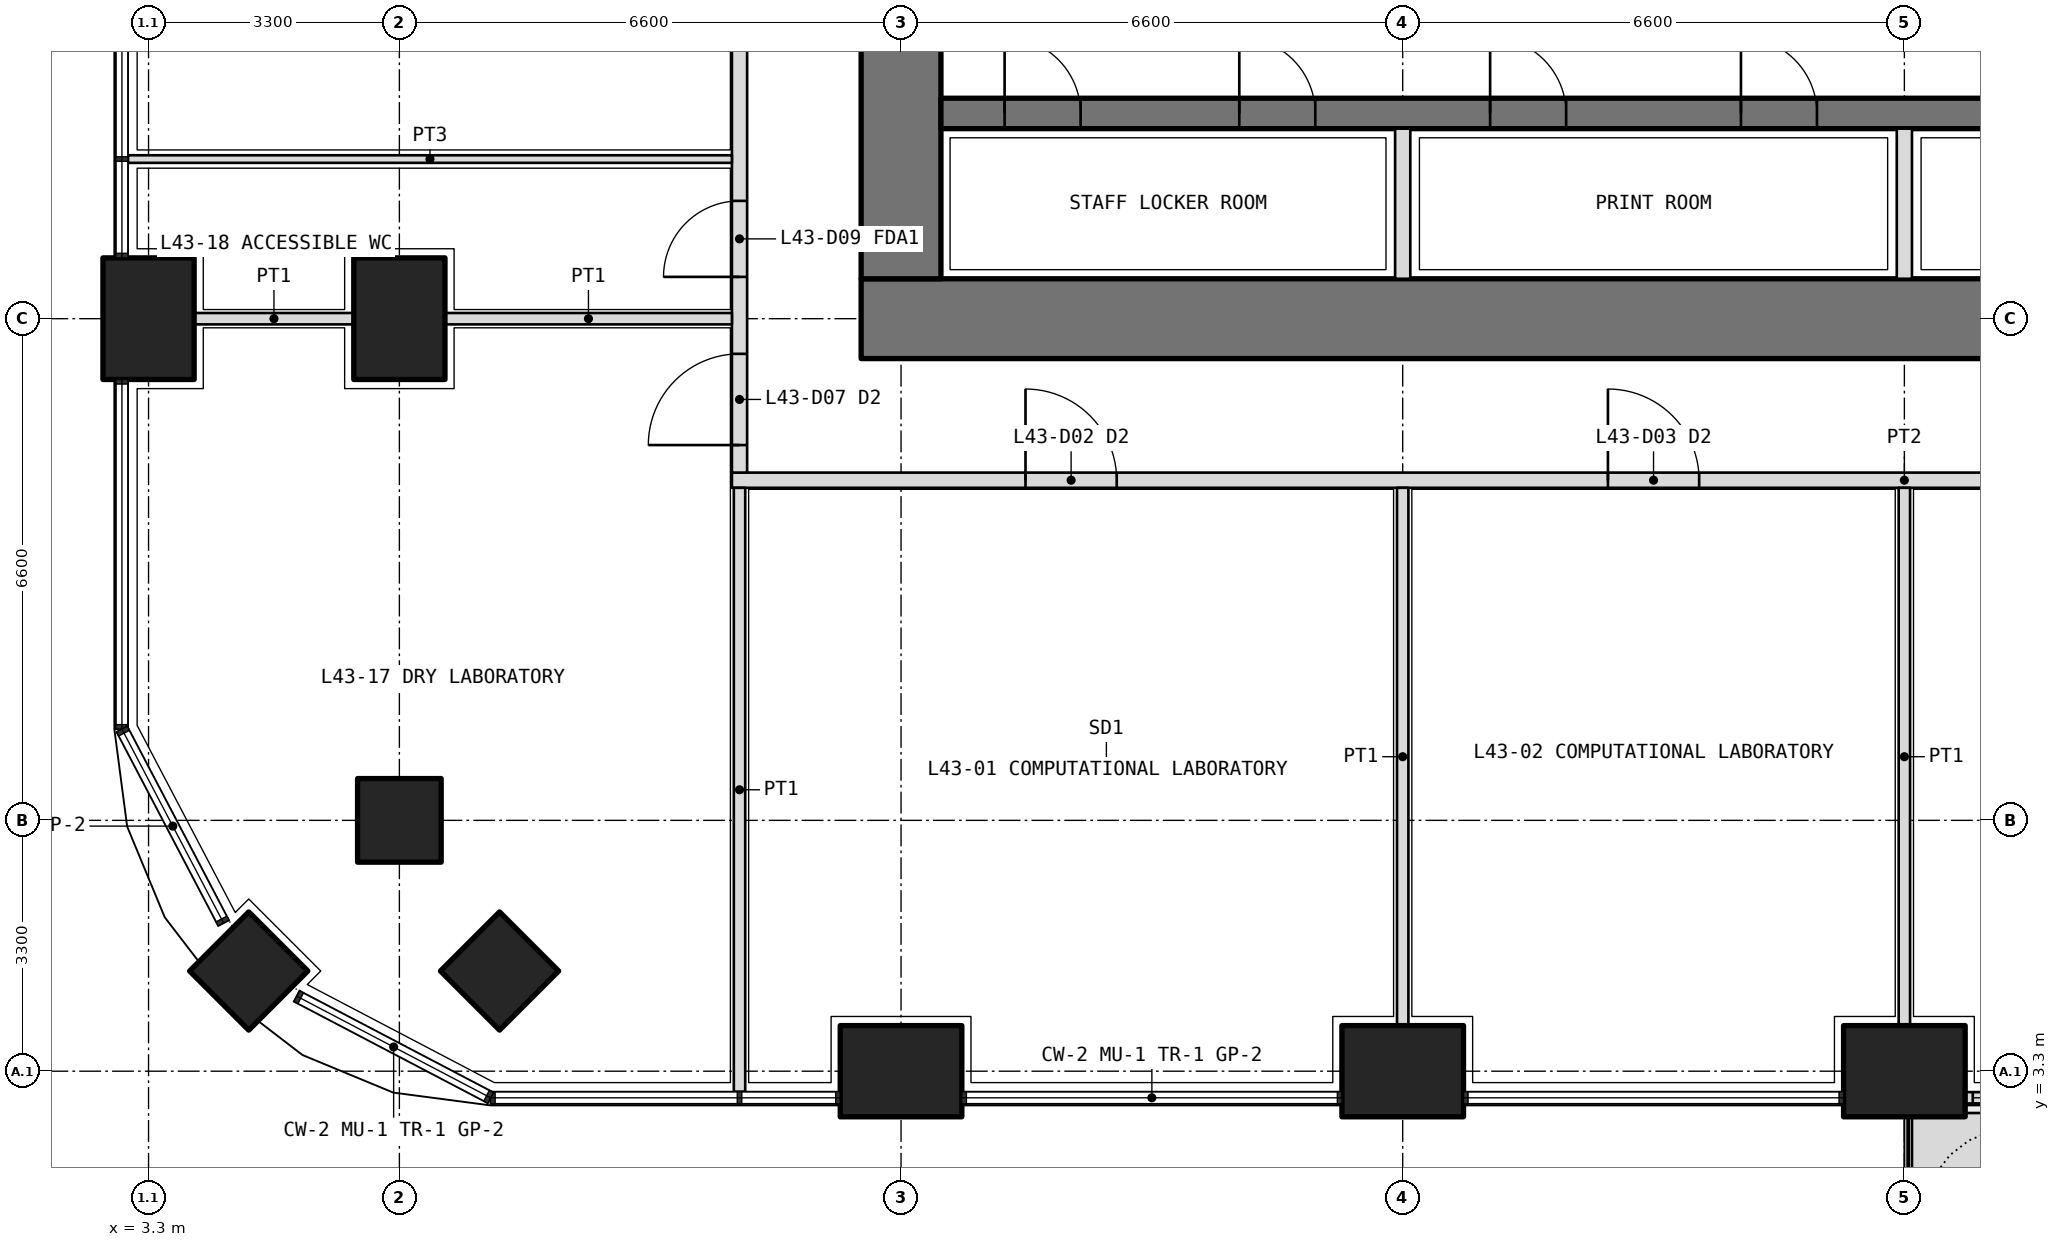
"""IFC4 building model, lengths in metres.
Left out: names, types, materials, properties, quantities, classifications, styles, units other than length and angle.
Written with IfcOpenShell. Run it as: python <this file> out.ifc"""

import sys

from ifc_helpers import new_model, si_unit, direction, frame, frame_2d, origin, origin_2d, place, context, subcontext, project, spatial, polyline, rectangle, outline, extrude, element, fill, save


model = new_model("IFC4")
c1 = context("Model", 3, precision=1e-05, world=origin(), true_north=direction((0.0, 1.0)))
c2 = subcontext(c1, "Body", "Model", "MODEL_VIEW")
j1 = project(units=[si_unit("LENGTHUNIT", "METRE"), si_unit("PLANEANGLEUNIT", "RADIAN")], contexts=[c1])
p1 = place(None, origin())
s1 = spatial("IfcSite", under=j1, at=p1, CompositionType="ELEMENT")
p2 = place(p1, origin())
s2 = spatial("IfcBuilding", under=s1, at=p2, CompositionType="ELEMENT")
p3 = place(p2, frame((0.0, 0.0, 189.3)))
s3 = spatial("IfcBuildingStorey", under=s2, at=p3, CompositionType="ELEMENT", Elevation=189.3)
p4 = place(p3, frame((4.618, 4.618, 0.0), z_axis=(0.0, 0.0, 1.0), x_axis=(0.707106781187, 0.707106781187, 0.0)))
e1 = element("IfcColumn", 1, at=p4, inside=s3, PredefinedType="COLUMN", context=c2, shape_type="SweptSolid", body=[
    extrude(rectangle(XDim=1.1, YDim=1.1, at=origin_2d()), origin(), (0.0, 0.0, 1.0), 4.2),
])
for number, where, z_axis, x_axis in (
    (2, (13.2, 3.3, 0.0), (0.0, 0.0, 1.0), (1.0, 0.0, 0.0)),
    (3, (19.8, 3.3, 0.0), (0.0, 0.0, 1.0), (1.0, 0.0, 0.0)),
    (4, (26.4, 3.3, 0.0), (0.0, 0.0, 1.0), (1.0, 0.0, 0.0)),
    (5, (3.3, 13.2, 0.0), (0.0, 0.0, 1.0), (0.0, 1.0, 0.0)),
):
    element("IfcColumn", number, at=place(p3, frame(where, z_axis=z_axis, x_axis=x_axis)), inside=s3, PredefinedType="COLUMN", context=c2, shape_type="SweptSolid", body=[
        extrude(rectangle(XDim=1.6, YDim=1.2, at=origin_2d()), origin(), (0.0, 0.0, 1.0), 4.2),
    ])
for number, where, z_axis, x_axis in (
    (6, (6.6, 6.6, 0.0), (0.0, 0.0, 1.0), (1.0, 0.0, 0.0)),
    (7, (7.918, 4.618, 0.0), (0.0, 0.0, 1.0), (0.707, 0.707, 0.0)),
):
    element("IfcColumn", number, at=place(p3, frame(where, z_axis=z_axis, x_axis=x_axis)), inside=s3, PredefinedType="COLUMN", context=c2, shape_type="SweptSolid", body=[
        extrude(rectangle(XDim=1.1, YDim=1.1, at=origin_2d()), origin(), (0.0, 0.0, 1.0), 4.2),
    ])
p5 = place(p3, frame((6.6, 13.2, 0.0), z_axis=(0.0, 0.0, 1.0), x_axis=(0.0, 1.0, 0.0)))
e8 = element("IfcColumn", 8, at=p5, inside=s3, PredefinedType="COLUMN", context=c2, shape_type="SweptSolid", body=[
    extrude(rectangle(XDim=1.6, YDim=1.2, at=origin_2d()), origin(), (0.0, 0.0, 1.0), 4.2),
])
p6 = place(p3, origin())
e9 = element("IfcWall", 9, at=p6, inside=s3, PredefinedType="USERDEFINED", context=c2, shape_type="SweptSolid", body=[
    extrude(outline(polyline([(26.5, 1.75), (28.95, 1.75), (28.95, 2.75), (26.5, 2.75), (26.5, 1.75)]), holes=[polyline([(26.65, 1.9), (28.8, 1.9), (28.8, 2.6), (26.65, 2.6), (26.65, 1.9)])]), origin(), (0.0, 0.0, 1.0), 1.05),
])
p7 = place(p3, frame((27.2, 2.95, 0.0), z_axis=(0.0, 0.0, 1.0), x_axis=(1.0, 0.0, 0.0)))
e10 = element("IfcWall", 10, at=p7, inside=s3, PredefinedType="SOLIDWALL", context=c2, shape_type="SweptSolid", body=[
    extrude(rectangle(XDim=5.0, YDim=0.15, at=frame_2d((2.5, 0.0))), origin(), (0.0, 0.0, 1.0), 2.7),
])
p8 = place(p7, frame((2.75, 0.0, 0.0)))
e11 = element("IfcOpeningElement", 11, at=p8, cuts=e10, PredefinedType="OPENING", context=c2, shape_type="SweptSolid", body=[
    extrude(rectangle(XDim=1.0, YDim=2.4, at=frame_2d((0.5, 1.2))), frame((0.0, 0.085, 0.0), z_axis=(0.0, -1.0, 0.0), x_axis=(1.0, 0.0, 0.0)), (0.0, 0.0, 1.0), 0.17),
])
p9 = place(p7, frame((0.1, 0.0, 0.1)))
e12 = element("IfcOpeningElement", 12, at=p9, cuts=e10, PredefinedType="OPENING", context=c2, shape_type="SweptSolid", body=[
    extrude(rectangle(XDim=2.15, YDim=2.3, at=frame_2d((1.075, 1.15))), frame((0.0, 0.085, 0.0), z_axis=(0.0, -1.0, 0.0), x_axis=(1.0, 0.0, 0.0)), (0.0, 0.0, 1.0), 0.17),
])
p10 = place(p7, frame((3.85, 0.0, 0.1)))
e13 = element("IfcOpeningElement", 13, at=p10, cuts=e10, PredefinedType="OPENING", context=c2, shape_type="SweptSolid", body=[
    extrude(rectangle(XDim=1.05, YDim=2.3, at=frame_2d((0.525, 1.15))), frame((0.0, 0.085, 0.0), z_axis=(0.0, -1.0, 0.0), x_axis=(1.0, 0.0, 0.0)), (0.0, 0.0, 1.0), 0.17),
])
p11 = place(p3, frame((12.675, 13.2, 0.0), z_axis=(0.0, 0.0, 1.0), x_axis=(1.0, 0.0, 0.0)))
e14 = element("IfcWall", 14, at=p11, inside=s3, PredefinedType="SHEAR", context=c2, shape_type="SweptSolid", body=[
    extrude(rectangle(XDim=27.45, YDim=1.05, at=frame_2d((13.725, 0.0))), origin(), (0.0, 0.0, 1.0), 4.2),
])
p12 = place(p3, frame((13.2, 32.475, 0.0), z_axis=(0.0, 0.0, 1.0), x_axis=(0.0, -1.0, 0.0)))
e15 = element("IfcWall", 15, at=p12, inside=s3, PredefinedType="SHEAR", context=c2, shape_type="SweptSolid", body=[
    extrude(rectangle(XDim=18.75, YDim=1.05, at=frame_2d((9.375, 0.0))), origin(), (0.0, 0.0, 1.0), 4.2),
])
p13 = place(p12, frame((14.125, 0.0, 0.0)))
e16 = element("IfcOpeningElement", 16, at=p13, cuts=e15, PredefinedType="OPENING", context=c2, shape_type="SweptSolid", body=[
    extrude(rectangle(XDim=1.6, YDim=2.1, at=frame_2d((0.8, 1.05))), frame((0.0, 0.535, 0.0), z_axis=(0.0, -1.0, 0.0), x_axis=(1.0, 0.0, 0.0)), (0.0, 0.0, 1.0), 1.07),
])
p14 = place(p12, frame((3.325, 0.0, 0.0)))
e17 = element("IfcOpeningElement", 17, at=p14, cuts=e15, PredefinedType="OPENING", context=c2, shape_type="SweptSolid", body=[
    extrude(rectangle(XDim=1.6, YDim=2.1, at=frame_2d((0.8, 1.05))), frame((0.0, 0.535, 0.0), z_axis=(0.0, -1.0, 0.0), x_axis=(1.0, 0.0, 0.0)), (0.0, 0.0, 1.0), 1.07),
])
p15 = place(p3, frame((13.725, 15.9, 0.0), z_axis=(0.0, 0.0, 1.0), x_axis=(1.0, 0.0, 0.0)))
e18 = element("IfcWall", 18, at=p15, inside=s3, PredefinedType="SHEAR", context=c2, shape_type="SweptSolid", body=[
    extrude(rectangle(XDim=25.35, YDim=0.4, at=frame_2d((12.675, 0.0))), origin(), (0.0, 0.0, 1.0), 4.2),
])
p16 = place(p15, frame((0.837, 0.0, 0.0)))
e19 = element("IfcOpeningElement", 19, at=p16, cuts=e18, PredefinedType="OPENING", context=c2, shape_type="SweptSolid", body=[
    extrude(rectangle(XDim=1.0, YDim=2.1, at=frame_2d((0.5, 1.05))), frame((0.0, 0.21, 0.0), z_axis=(0.0, -1.0, 0.0), x_axis=(1.0, 0.0, 0.0)), (0.0, 0.0, 1.0), 0.42),
])
p17 = place(p15, frame((3.925, 0.0, 0.0)))
e20 = element("IfcOpeningElement", 20, at=p17, cuts=e18, PredefinedType="OPENING", context=c2, shape_type="SweptSolid", body=[
    extrude(rectangle(XDim=1.0, YDim=2.1, at=frame_2d((0.5, 1.05))), frame((0.0, 0.21, 0.0), z_axis=(0.0, -1.0, 0.0), x_axis=(1.0, 0.0, 0.0)), (0.0, 0.0, 1.0), 0.42),
])
p18 = place(p15, frame((7.225, 0.0, 0.0)))
e21 = element("IfcOpeningElement", 21, at=p18, cuts=e18, PredefinedType="OPENING", context=c2, shape_type="SweptSolid", body=[
    extrude(rectangle(XDim=1.0, YDim=2.1, at=frame_2d((0.5, 1.05))), frame((0.0, 0.21, 0.0), z_axis=(0.0, -1.0, 0.0), x_axis=(1.0, 0.0, 0.0)), (0.0, 0.0, 1.0), 0.42),
])
p19 = place(p15, frame((10.525, 0.0, 0.0)))
e22 = element("IfcOpeningElement", 22, at=p19, cuts=e18, PredefinedType="OPENING", context=c2, shape_type="SweptSolid", body=[
    extrude(rectangle(XDim=1.0, YDim=2.1, at=frame_2d((0.5, 1.05))), frame((0.0, 0.21, 0.0), z_axis=(0.0, -1.0, 0.0), x_axis=(1.0, 0.0, 0.0)), (0.0, 0.0, 1.0), 0.42),
])
p20 = place(p15, frame((13.825, 0.0, 0.0)))
e23 = element("IfcOpeningElement", 23, at=p20, cuts=e18, PredefinedType="OPENING", context=c2, shape_type="SweptSolid", body=[
    extrude(rectangle(XDim=1.0, YDim=2.1, at=frame_2d((0.5, 1.05))), frame((0.0, 0.21, 0.0), z_axis=(0.0, -1.0, 0.0), x_axis=(1.0, 0.0, 0.0)), (0.0, 0.0, 1.0), 0.42),
])
p21 = place(p15, frame((17.125, 0.0, 0.0)))
e24 = element("IfcOpeningElement", 24, at=p21, cuts=e18, PredefinedType="OPENING", context=c2, shape_type="SweptSolid", body=[
    extrude(rectangle(XDim=1.0, YDim=2.1, at=frame_2d((0.5, 1.05))), frame((0.0, 0.21, 0.0), z_axis=(0.0, -1.0, 0.0), x_axis=(1.0, 0.0, 0.0)), (0.0, 0.0, 1.0), 0.42),
])
p22 = place(p15, frame((20.425, 0.0, 0.0)))
e25 = element("IfcOpeningElement", 25, at=p22, cuts=e18, PredefinedType="OPENING", context=c2, shape_type="SweptSolid", body=[
    extrude(rectangle(XDim=1.0, YDim=2.1, at=frame_2d((0.5, 1.05))), frame((0.0, 0.21, 0.0), z_axis=(0.0, -1.0, 0.0), x_axis=(1.0, 0.0, 0.0)), (0.0, 0.0, 1.0), 0.42),
])
p23 = place(p15, frame((23.512, 0.0, 0.0)))
e26 = element("IfcOpeningElement", 26, at=p23, cuts=e18, PredefinedType="OPENING", context=c2, shape_type="SweptSolid", body=[
    extrude(rectangle(XDim=1.0, YDim=2.1, at=frame_2d((0.5, 1.05))), frame((0.0, 0.21, 0.0), z_axis=(0.0, -1.0, 0.0), x_axis=(1.0, 0.0, 0.0)), (0.0, 0.0, 1.0), 0.42),
])
for number, where, z_axis, x_axis in (
    (27, (19.8, 13.725, 0.0), (0.0, 0.0, 1.0), (0.0, 1.0, 0.0)),
    (28, (26.4, 13.725, 0.0), (0.0, 0.0, 1.0), (0.0, 1.0, 0.0)),
):
    element("IfcWall", number, at=place(p3, frame(where, z_axis=z_axis, x_axis=x_axis)), inside=s3, PredefinedType="PARTITIONING", context=c2, shape_type="SweptSolid", body=[
        extrude(rectangle(XDim=1.975, YDim=0.2, at=frame_2d((0.987, 0.0))), origin(), (0.0, 0.0, 1.0), 4.2),
    ])
p24 = place(p3, frame((10.975, 11.075, 0.0), z_axis=(0.0, 0.0, 1.0), x_axis=(1.0, 0.0, 0.0)))
e29 = element("IfcWall", 29, at=p24, inside=s3, PredefinedType="PARTITIONING", context=c2, shape_type="SweptSolid", body=[
    extrude(rectangle(XDim=30.85, YDim=0.2, at=frame_2d((15.425, 0.0))), origin(), (0.0, 0.0, 1.0), 2.85),
])
p25 = place(p24, frame((3.863, 0.0, 0.0)))
e30 = element("IfcOpeningElement", 30, at=p25, cuts=e29, PredefinedType="OPENING", context=c2, shape_type="SweptSolid", body=[
    extrude(rectangle(XDim=1.2, YDim=2.1, at=frame_2d((0.6, 1.05))), frame((0.0, 0.11, 0.0), z_axis=(0.0, -1.0, 0.0), x_axis=(1.0, 0.0, 0.0)), (0.0, 0.0, 1.0), 0.22),
])
p26 = place(p24, frame((11.525, 0.0, 0.0)))
e31 = element("IfcOpeningElement", 31, at=p26, cuts=e29, PredefinedType="OPENING", context=c2, shape_type="SweptSolid", body=[
    extrude(rectangle(XDim=1.2, YDim=2.1, at=frame_2d((0.6, 1.05))), frame((0.0, 0.11, 0.0), z_axis=(0.0, -1.0, 0.0), x_axis=(1.0, 0.0, 0.0)), (0.0, 0.0, 1.0), 0.22),
])
p27 = place(p24, frame((18.125, 0.0, 0.0)))
e32 = element("IfcOpeningElement", 32, at=p27, cuts=e29, PredefinedType="OPENING", context=c2, shape_type="SweptSolid", body=[
    extrude(rectangle(XDim=1.2, YDim=2.1, at=frame_2d((0.6, 1.05))), frame((0.0, 0.11, 0.0), z_axis=(0.0, -1.0, 0.0), x_axis=(1.0, 0.0, 0.0)), (0.0, 0.0, 1.0), 0.22),
])
p28 = place(p24, frame((23.075, 0.0, 0.0)))
e33 = element("IfcOpeningElement", 33, at=p28, cuts=e29, PredefinedType="OPENING", context=c2, shape_type="SweptSolid", body=[
    extrude(rectangle(XDim=1.2, YDim=2.1, at=frame_2d((0.6, 1.05))), frame((0.0, 0.11, 0.0), z_axis=(0.0, -1.0, 0.0), x_axis=(1.0, 0.0, 0.0)), (0.0, 0.0, 1.0), 0.22),
])
p29 = place(p24, frame((27.438, 0.0, 0.0)))
e34 = element("IfcOpeningElement", 34, at=p29, cuts=e29, PredefinedType="OPENING", context=c2, shape_type="SweptSolid", body=[
    extrude(rectangle(XDim=1.2, YDim=2.1, at=frame_2d((0.6, 1.05))), frame((0.0, 0.11, 0.0), z_axis=(0.0, -1.0, 0.0), x_axis=(1.0, 0.0, 0.0)), (0.0, 0.0, 1.0), 0.22),
])
p30 = place(p3, frame((11.075, 11.175, 0.0), z_axis=(0.0, 0.0, 1.0), x_axis=(0.0, 1.0, 0.0)))
e35 = element("IfcWall", 35, at=p30, inside=s3, PredefinedType="PARTITIONING", context=c2, shape_type="SweptSolid", body=[
    extrude(rectangle(XDim=15.225, YDim=0.2, at=frame_2d((7.612, 0.0))), origin(), (0.0, 0.0, 1.0), 2.85),
])
p31 = place(p30, frame((0.363, 0.0, 0.0)))
e36 = element("IfcOpeningElement", 36, at=p31, cuts=e35, PredefinedType="OPENING", context=c2, shape_type="SweptSolid", body=[
    extrude(rectangle(XDim=1.2, YDim=2.1, at=frame_2d((0.6, 1.05))), frame((0.0, 0.11, 0.0), z_axis=(0.0, -1.0, 0.0), x_axis=(1.0, 0.0, 0.0)), (0.0, 0.0, 1.0), 0.22),
])
p32 = place(p30, frame((2.575, 0.0, 0.0)))
e37 = element("IfcOpeningElement", 37, at=p32, cuts=e35, PredefinedType="OPENING", context=c2, shape_type="SweptSolid", body=[
    extrude(rectangle(XDim=1.0, YDim=2.1, at=frame_2d((0.5, 1.05))), frame((0.0, 0.11, 0.0), z_axis=(0.0, -1.0, 0.0), x_axis=(1.0, 0.0, 0.0)), (0.0, 0.0, 1.0), 0.22),
])
p33 = place(p30, frame((5.625, 0.0, 0.0)))
e38 = element("IfcOpeningElement", 38, at=p33, cuts=e35, PredefinedType="OPENING", context=c2, shape_type="SweptSolid", body=[
    extrude(rectangle(XDim=0.9, YDim=2.1, at=frame_2d((0.45, 1.05))), frame((0.0, 0.11, 0.0), z_axis=(0.0, -1.0, 0.0), x_axis=(1.0, 0.0, 0.0)), (0.0, 0.0, 1.0), 0.22),
])
p34 = place(p30, frame((9.425, 0.0, 0.0)))
e39 = element("IfcOpeningElement", 39, at=p34, cuts=e35, PredefinedType="OPENING", context=c2, shape_type="SweptSolid", body=[
    extrude(rectangle(XDim=0.9, YDim=2.1, at=frame_2d((0.45, 1.05))), frame((0.0, 0.11, 0.0), z_axis=(0.0, -1.0, 0.0), x_axis=(1.0, 0.0, 0.0)), (0.0, 0.0, 1.0), 0.22),
])
p35 = place(p30, frame((12.975, 0.0, 0.0)))
e40 = element("IfcOpeningElement", 40, at=p35, cuts=e35, PredefinedType="OPENING", context=c2, shape_type="SweptSolid", body=[
    extrude(rectangle(XDim=1.0, YDim=2.1, at=frame_2d((0.5, 1.05))), frame((0.0, 0.11, 0.0), z_axis=(0.0, -1.0, 0.0), x_axis=(1.0, 0.0, 0.0)), (0.0, 0.0, 1.0), 0.22),
])
p36 = place(p3, frame((11.075, 3.03, 0.0), z_axis=(0.0, 0.0, 1.0), x_axis=(0.0, 1.0, 0.0)))
e41 = element("IfcWall", 41, at=p36, inside=s3, PredefinedType="PARTITIONING", context=c2, shape_type="SweptSolid", body=[
    extrude(rectangle(XDim=7.945, YDim=0.15, at=frame_2d((3.973, 0.0))), origin(), (0.0, 0.0, 1.0), 2.7),
])
for number, where, z_axis, x_axis in (
    (42, (19.8, 3.9, 0.0), (0.0, 0.0, 1.0), (0.0, 1.0, 0.0)),
    (43, (26.4, 3.9, 0.0), (0.0, 0.0, 1.0), (0.0, 1.0, 0.0)),
):
    element("IfcWall", number, at=place(p3, frame(where, z_axis=z_axis, x_axis=x_axis)), inside=s3, PredefinedType="PARTITIONING", context=c2, shape_type="SweptSolid", body=[
        extrude(rectangle(XDim=7.075, YDim=0.15, at=frame_2d((3.538, 0.0))), origin(), (0.0, 0.0, 1.0), 2.85),
    ])
p37 = place(p3, frame((3.03, 15.3, 0.0), z_axis=(0.0, 0.0, 1.0), x_axis=(1.0, 0.0, 0.0)))
e44 = element("IfcWall", 44, at=p37, inside=s3, PredefinedType="PARTITIONING", context=c2, shape_type="SweptSolid", body=[
    extrude(rectangle(XDim=7.945, YDim=0.1, at=frame_2d((3.973, 0.0))), origin(), (0.0, 0.0, 1.0), 2.7),
])
p38 = place(p3, frame((3.9, 13.2, 0.0), z_axis=(0.0, 0.0, 1.0), x_axis=(1.0, 0.0, 0.0)))
e45 = element("IfcWall", 45, at=p38, inside=s3, PredefinedType="PARTITIONING", context=c2, shape_type="SweptSolid", body=[
    extrude(rectangle(XDim=2.1, YDim=0.15, at=frame_2d((1.05, 0.0))), origin(), (0.0, 0.0, 1.0), 2.85),
])
p39 = place(p3, frame((7.2, 13.2, 0.0), z_axis=(0.0, 0.0, 1.0), x_axis=(1.0, 0.0, 0.0)))
e46 = element("IfcWall", 46, at=p39, inside=s3, PredefinedType="PARTITIONING", context=c2, shape_type="SweptSolid", body=[
    extrude(rectangle(XDim=3.775, YDim=0.15, at=frame_2d((1.888, 0.0))), origin(), (0.0, 0.0, 1.0), 2.85),
])
p40 = place(p9, origin())
e47 = element("IfcWindow", 47, at=p40, inside=s3, PartitioningType="SINGLE_PANEL", PredefinedType="WINDOW", context=c2, shape_type="SweptSolid", body=[
    extrude(rectangle(XDim=2.15, YDim=2.3, at=frame_2d((1.075, 1.15))), frame((0.0, 0.03, 0.0), z_axis=(0.0, -1.0, 0.0), x_axis=(1.0, 0.0, 0.0)), (0.0, 0.0, 1.0), 0.06),
])
fill(e12, e47)
p41 = place(p25, origin())
e48 = element("IfcDoor", 48, at=p41, inside=s3, OperationType="DOUBLE_DOOR_SINGLE_SWING", PredefinedType="DOOR", context=c2, shape_type="SweptSolid", body=[
    extrude(rectangle(XDim=1.2, YDim=2.1, at=frame_2d((0.6, 1.05))), frame((0.0, 0.025, 0.0), z_axis=(0.0, -1.0, 0.0), x_axis=(1.0, 0.0, 0.0)), (0.0, 0.0, 1.0), 0.05),
])
fill(e30, e48)
p42 = place(p26, origin())
e49 = element("IfcDoor", 49, at=p42, inside=s3, OperationType="DOUBLE_DOOR_SINGLE_SWING", PredefinedType="DOOR", context=c2, shape_type="SweptSolid", body=[
    extrude(rectangle(XDim=1.2, YDim=2.1, at=frame_2d((0.6, 1.05))), frame((0.0, 0.025, 0.0), z_axis=(0.0, -1.0, 0.0), x_axis=(1.0, 0.0, 0.0)), (0.0, 0.0, 1.0), 0.05),
])
fill(e31, e49)
p43 = place(p31, origin())
e50 = element("IfcDoor", 50, at=p43, inside=s3, OperationType="DOUBLE_DOOR_SINGLE_SWING", PredefinedType="DOOR", context=c2, shape_type="SweptSolid", body=[
    extrude(rectangle(XDim=1.2, YDim=2.1, at=frame_2d((0.6, 1.05))), frame((0.0, 0.025, 0.0), z_axis=(0.0, -1.0, 0.0), x_axis=(1.0, 0.0, 0.0)), (0.0, 0.0, 1.0), 0.05),
])
fill(e36, e50)
p44 = place(p32, origin())
e51 = element("IfcDoor", 51, at=p44, inside=s3, OperationType="SINGLE_SWING_LEFT", PredefinedType="DOOR", context=c2, shape_type="SweptSolid", body=[
    extrude(rectangle(XDim=1.0, YDim=2.1, at=frame_2d((0.5, 1.05))), frame((0.0, 0.025, 0.0), z_axis=(0.0, -1.0, 0.0), x_axis=(1.0, 0.0, 0.0)), (0.0, 0.0, 1.0), 0.05),
])
fill(e37, e51)
p45 = place(p16, origin())
e52 = element("IfcDoor", 52, at=p45, inside=s3, OperationType="SINGLE_SWING_LEFT", PredefinedType="DOOR", context=c2, shape_type="SweptSolid", body=[
    extrude(rectangle(XDim=1.0, YDim=2.1, at=frame_2d((0.5, 1.05))), frame((0.0, 0.025, 0.0), z_axis=(0.0, -1.0, 0.0), x_axis=(1.0, 0.0, 0.0)), (0.0, 0.0, 1.0), 0.05),
])
fill(e19, e52)
p46 = place(p17, origin())
e53 = element("IfcDoor", 53, at=p46, inside=s3, OperationType="SINGLE_SWING_LEFT", PredefinedType="DOOR", context=c2, shape_type="SweptSolid", body=[
    extrude(rectangle(XDim=1.0, YDim=2.1, at=frame_2d((0.5, 1.05))), frame((0.0, 0.025, 0.0), z_axis=(0.0, -1.0, 0.0), x_axis=(1.0, 0.0, 0.0)), (0.0, 0.0, 1.0), 0.05),
])
fill(e20, e53)
p47 = place(p18, origin())
e54 = element("IfcDoor", 54, at=p47, inside=s3, OperationType="SINGLE_SWING_LEFT", PredefinedType="DOOR", context=c2, shape_type="SweptSolid", body=[
    extrude(rectangle(XDim=1.0, YDim=2.1, at=frame_2d((0.5, 1.05))), frame((0.0, 0.025, 0.0), z_axis=(0.0, -1.0, 0.0), x_axis=(1.0, 0.0, 0.0)), (0.0, 0.0, 1.0), 0.05),
])
fill(e21, e54)
p48 = place(p19, origin())
e55 = element("IfcDoor", 55, at=p48, inside=s3, OperationType="SINGLE_SWING_LEFT", PredefinedType="DOOR", context=c2, shape_type="SweptSolid", body=[
    extrude(rectangle(XDim=1.0, YDim=2.1, at=frame_2d((0.5, 1.05))), frame((0.0, 0.025, 0.0), z_axis=(0.0, -1.0, 0.0), x_axis=(1.0, 0.0, 0.0)), (0.0, 0.0, 1.0), 0.05),
])
fill(e22, e55)
save(model, sys.argv[1])
